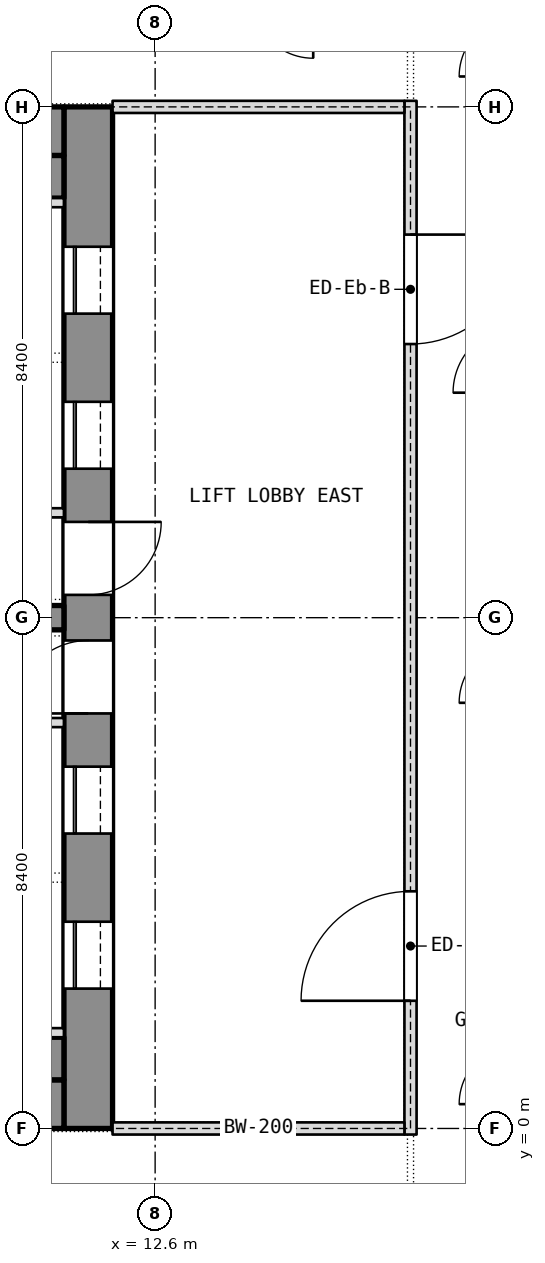
"""IFC4 building model, lengths in metres.
Left out: names, types, materials, properties, quantities, classifications, styles, units other than length and angle.
Written with IfcOpenShell. Run it as: python <this file> out.ifc"""

import sys

from ifc_helpers import new_model, si_unit, direction, frame, frame_2d, origin, place, context, subcontext, project, spatial, rectangle, extrude, element, fill, save


model = new_model("IFC4")
c1 = context("Model", 3, precision=1e-05, world=origin(), true_north=direction((0.0, 1.0)))
c2 = subcontext(c1, "Body", "Model", "MODEL_VIEW")
j1 = project(units=[si_unit("LENGTHUNIT", "METRE"), si_unit("PLANEANGLEUNIT", "RADIAN")], contexts=[c1])
p1 = place(None, origin())
s1 = spatial("IfcSite", under=j1, at=p1, CompositionType="ELEMENT")
p2 = place(p1, origin())
s2 = spatial("IfcBuilding", under=s1, at=p2, CompositionType="ELEMENT")
p3 = place(p2, frame((0.0, 0.0, 245.3)))
s3 = spatial("IfcBuildingStorey", under=s2, at=p3, CompositionType="ELEMENT", Elevation=245.3)
p4 = place(p3, frame((11.5, 0.0, 0.0), z_axis=(0.0, 0.0, 1.0), x_axis=(0.0, 1.0, 0.0)))
e1 = element("IfcWall", 1, at=p4, inside=s3, PredefinedType="SHEAR", context=c2, shape_type="SweptSolid", body=[
    extrude(rectangle(XDim=16.8, YDim=0.8, at=frame_2d((8.4, 0.0))), origin(), (0.0, 0.0, 1.0), 3.6),
])
p5 = place(p4, frame((2.3, 0.0, 0.0)))
e2 = element("IfcOpeningElement", 2, at=p5, cuts=e1, PredefinedType="OPENING", context=c2, shape_type="SweptSolid", body=[
    extrude(rectangle(XDim=1.1, YDim=2.1, at=frame_2d((0.55, 1.05))), frame((0.0, 0.4, 0.0), z_axis=(0.0, -1.0, 0.0), x_axis=(1.0, 0.0, 0.0)), (0.0, 0.0, 1.0), 0.8),
])
p6 = place(p4, frame((4.85, 0.0, 0.0)))
e3 = element("IfcOpeningElement", 3, at=p6, cuts=e1, PredefinedType="OPENING", context=c2, shape_type="SweptSolid", body=[
    extrude(rectangle(XDim=1.1, YDim=2.1, at=frame_2d((0.55, 1.05))), frame((0.0, 0.4, 0.0), z_axis=(0.0, -1.0, 0.0), x_axis=(1.0, 0.0, 0.0)), (0.0, 0.0, 1.0), 0.8),
])
p7 = place(p4, frame((6.825, 0.0, 0.0)))
e4 = element("IfcOpeningElement", 4, at=p7, cuts=e1, PredefinedType="OPENING", context=c2, shape_type="SweptSolid", body=[
    extrude(rectangle(XDim=1.2, YDim=2.1, at=frame_2d((0.6, 1.05))), frame((0.0, 0.4, 0.0), z_axis=(0.0, -1.0, 0.0), x_axis=(1.0, 0.0, 0.0)), (0.0, 0.0, 1.0), 0.8),
])
p8 = place(p4, frame((13.4, 0.0, 0.0)))
e5 = element("IfcOpeningElement", 5, at=p8, cuts=e1, PredefinedType="OPENING", context=c2, shape_type="SweptSolid", body=[
    extrude(rectangle(XDim=1.1, YDim=2.1, at=frame_2d((0.55, 1.05))), frame((0.0, 0.4, 0.0), z_axis=(0.0, -1.0, 0.0), x_axis=(1.0, 0.0, 0.0)), (0.0, 0.0, 1.0), 0.8),
])
p9 = place(p4, frame((10.85, 0.0, 0.0)))
e6 = element("IfcOpeningElement", 6, at=p9, cuts=e1, PredefinedType="OPENING", context=c2, shape_type="SweptSolid", body=[
    extrude(rectangle(XDim=1.1, YDim=2.1, at=frame_2d((0.55, 1.05))), frame((0.0, 0.4, 0.0), z_axis=(0.0, -1.0, 0.0), x_axis=(1.0, 0.0, 0.0)), (0.0, 0.0, 1.0), 0.8),
])
p10 = place(p4, frame((8.775, 0.0, 0.0)))
e7 = element("IfcOpeningElement", 7, at=p10, cuts=e1, PredefinedType="OPENING", context=c2, shape_type="SweptSolid", body=[
    extrude(rectangle(XDim=1.2, YDim=2.1, at=frame_2d((0.6, 1.05))), frame((0.0, 0.4, 0.0), z_axis=(0.0, -1.0, 0.0), x_axis=(1.0, 0.0, 0.0)), (0.0, 0.0, 1.0), 0.8),
])
for number, where, z_axis, x_axis in (
    (8, (-11.1, 0.4, 0.0), (0.0, 0.0, 1.0), (1.0, 0.0, 0.0)),
    (9, (-11.1, 16.4, 0.0), (0.0, 0.0, 1.0), (1.0, 0.0, 0.0)),
):
    element("IfcWall", number, at=place(p3, frame(where, z_axis=z_axis, x_axis=x_axis)), inside=s3, PredefinedType="SHEAR", context=c2, shape_type="SweptSolid", body=[
        extrude(rectangle(XDim=22.2, YDim=0.8, at=frame_2d((11.1, 0.0))), origin(), (0.0, 0.0, 1.0), 3.6),
    ])
p11 = place(p3, frame((4.4, 8.4, 0.0), z_axis=(0.0, 0.0, 1.0), x_axis=(1.0, 0.0, 0.0)))
e10 = element("IfcWall", 10, at=p11, inside=s3, PredefinedType="SHEAR", context=c2, shape_type="SweptSolid", body=[
    extrude(rectangle(XDim=6.7, YDim=0.4, at=frame_2d((3.35, 0.0))), origin(), (0.0, 0.0, 1.0), 3.6),
])
for number, where, z_axis, x_axis in (
    (11, (-11.1, 1.15, 0.0), (0.0, 0.0, 1.0), (1.0, 0.0, 0.0)),
    (12, (-11.1, 15.65, 0.0), (0.0, 0.0, 1.0), (1.0, 0.0, 0.0)),
):
    element("IfcWall", number, at=place(p3, frame(where, z_axis=z_axis, x_axis=x_axis)), inside=s3, PredefinedType="PARTITIONING", context=c2, shape_type="SweptSolid", body=[
        extrude(rectangle(XDim=22.2, YDim=0.7, at=frame_2d((11.1, 0.0))), origin(), (0.0, 0.0, 1.0), 3.34),
    ])
for number, where, z_axis, x_axis in (
    (13, (9.0, 6.675, 0.0), (0.0, 0.0, 1.0), (1.0, 0.0, 0.0)),
    (14, (9.0, 1.575, 0.0), (0.0, 0.0, 1.0), (1.0, 0.0, 0.0)),
    (15, (9.0, 10.125, 0.0), (0.0, 0.0, 1.0), (1.0, 0.0, 0.0)),
    (16, (9.0, 15.225, 0.0), (0.0, 0.0, 1.0), (1.0, 0.0, 0.0)),
):
    element("IfcWall", number, at=place(p3, frame(where, z_axis=z_axis, x_axis=x_axis)), inside=s3, PredefinedType="SHEAR", context=c2, shape_type="SweptSolid", body=[
        extrude(rectangle(XDim=2.1, YDim=0.15, at=frame_2d((1.05, 0.0))), origin(), (0.0, 0.0, 1.0), 3.6),
    ])
p12 = place(p3, frame((16.8, -0.1, 0.0), z_axis=(0.0, 0.0, 1.0), x_axis=(0.0, 1.0, 0.0)))
e17 = element("IfcWall", 17, at=p12, inside=s3, PredefinedType="PARTITIONING", context=c2, shape_type="SweptSolid", body=[
    extrude(rectangle(XDim=17.0, YDim=0.2, at=frame_2d((8.5, 0.0))), origin(), (0.0, 0.0, 1.0), 3.34),
])
p13 = place(p12, frame((2.2, 0.0, 0.0)))
e18 = element("IfcOpeningElement", 18, at=p13, cuts=e17, PredefinedType="OPENING", context=c2, shape_type="SweptSolid", body=[
    extrude(rectangle(XDim=1.8, YDim=2.1, at=frame_2d((0.9, 1.05))), frame((0.0, 0.1, 0.0), z_axis=(0.0, -1.0, 0.0), x_axis=(1.0, 0.0, 0.0)), (0.0, 0.0, 1.0), 0.2),
])
p14 = place(p12, frame((13.0, 0.0, 0.0)))
e19 = element("IfcOpeningElement", 19, at=p14, cuts=e17, PredefinedType="OPENING", context=c2, shape_type="SweptSolid", body=[
    extrude(rectangle(XDim=1.8, YDim=2.1, at=frame_2d((0.9, 1.05))), frame((0.0, 0.1, 0.0), z_axis=(0.0, -1.0, 0.0), x_axis=(1.0, 0.0, 0.0)), (0.0, 0.0, 1.0), 0.2),
])
for number, where, z_axis, x_axis in (
    (20, (11.9, 0.0, 0.0), (0.0, 0.0, 1.0), (1.0, 0.0, 0.0)),
    (21, (11.9, 16.8, 0.0), (0.0, 0.0, 1.0), (1.0, 0.0, 0.0)),
):
    element("IfcWall", number, at=place(p3, frame(where, z_axis=z_axis, x_axis=x_axis)), inside=s3, PredefinedType="PARTITIONING", context=c2, shape_type="SweptSolid", body=[
        extrude(rectangle(XDim=4.8, YDim=0.2, at=frame_2d((2.4, 0.0))), origin(), (0.0, 0.0, 1.0), 2.94),
    ])
p15 = place(p5, origin())
e22 = element("IfcDoor", 22, at=p15, inside=s3, OperationType="SLIDING_TO_LEFT", PredefinedType="DOOR", context=c2, shape_type="SweptSolid", body=[
    extrude(rectangle(XDim=1.1, YDim=2.1, at=frame_2d((0.55, 1.05))), frame((0.0, 0.025, 0.0), z_axis=(0.0, -1.0, 0.0), x_axis=(1.0, 0.0, 0.0)), (0.0, 0.0, 1.0), 0.05),
])
fill(e2, e22)
p16 = place(p6, origin())
e23 = element("IfcDoor", 23, at=p16, inside=s3, OperationType="SLIDING_TO_LEFT", PredefinedType="DOOR", context=c2, shape_type="SweptSolid", body=[
    extrude(rectangle(XDim=1.1, YDim=2.1, at=frame_2d((0.55, 1.05))), frame((0.0, 0.025, 0.0), z_axis=(0.0, -1.0, 0.0), x_axis=(1.0, 0.0, 0.0)), (0.0, 0.0, 1.0), 0.05),
])
fill(e3, e23)
p17 = place(p7, origin())
e24 = element("IfcDoor", 24, at=p17, inside=s3, OperationType="SINGLE_SWING_LEFT", PredefinedType="DOOR", context=c2, shape_type="SweptSolid", body=[
    extrude(rectangle(XDim=1.2, YDim=2.1, at=frame_2d((0.6, 1.05))), frame((0.0, 0.025, 0.0), z_axis=(0.0, -1.0, 0.0), x_axis=(1.0, 0.0, 0.0)), (0.0, 0.0, 1.0), 0.05),
])
fill(e4, e24)
p18 = place(p8, origin())
e25 = element("IfcDoor", 25, at=p18, inside=s3, OperationType="SLIDING_TO_LEFT", PredefinedType="DOOR", context=c2, shape_type="SweptSolid", body=[
    extrude(rectangle(XDim=1.1, YDim=2.1, at=frame_2d((0.55, 1.05))), frame((0.0, 0.025, 0.0), z_axis=(0.0, -1.0, 0.0), x_axis=(1.0, 0.0, 0.0)), (0.0, 0.0, 1.0), 0.05),
])
fill(e5, e25)
p19 = place(p9, origin())
e26 = element("IfcDoor", 26, at=p19, inside=s3, OperationType="SLIDING_TO_LEFT", PredefinedType="DOOR", context=c2, shape_type="SweptSolid", body=[
    extrude(rectangle(XDim=1.1, YDim=2.1, at=frame_2d((0.55, 1.05))), frame((0.0, 0.025, 0.0), z_axis=(0.0, -1.0, 0.0), x_axis=(1.0, 0.0, 0.0)), (0.0, 0.0, 1.0), 0.05),
])
fill(e6, e26)
p20 = place(p10, origin())
e27 = element("IfcDoor", 27, at=p20, inside=s3, OperationType="SINGLE_SWING_LEFT", PredefinedType="DOOR", context=c2, shape_type="SweptSolid", body=[
    extrude(rectangle(XDim=1.2, YDim=2.1, at=frame_2d((0.6, 1.05))), frame((0.0, 0.025, 0.0), z_axis=(0.0, -1.0, 0.0), x_axis=(1.0, 0.0, 0.0)), (0.0, 0.0, 1.0), 0.05),
])
fill(e7, e27)
p21 = place(p13, origin())
e28 = element("IfcDoor", 28, at=p21, inside=s3, OperationType="DOUBLE_DOOR_SINGLE_SWING", PredefinedType="DOOR", context=c2, shape_type="SweptSolid", body=[
    extrude(rectangle(XDim=1.8, YDim=2.1, at=frame_2d((0.9, 1.05))), frame((0.0, 0.025, 0.0), z_axis=(0.0, -1.0, 0.0), x_axis=(1.0, 0.0, 0.0)), (0.0, 0.0, 1.0), 0.05),
])
fill(e18, e28)
p22 = place(p14, origin())
e29 = element("IfcDoor", 29, at=p22, inside=s3, OperationType="DOUBLE_DOOR_SINGLE_SWING", PredefinedType="DOOR", context=c2, shape_type="SweptSolid", body=[
    extrude(rectangle(XDim=1.8, YDim=2.1, at=frame_2d((0.9, 1.05))), frame((0.0, 0.025, 0.0), z_axis=(0.0, -1.0, 0.0), x_axis=(1.0, 0.0, 0.0)), (0.0, 0.0, 1.0), 0.05),
])
fill(e19, e29)
save(model, sys.argv[1])
